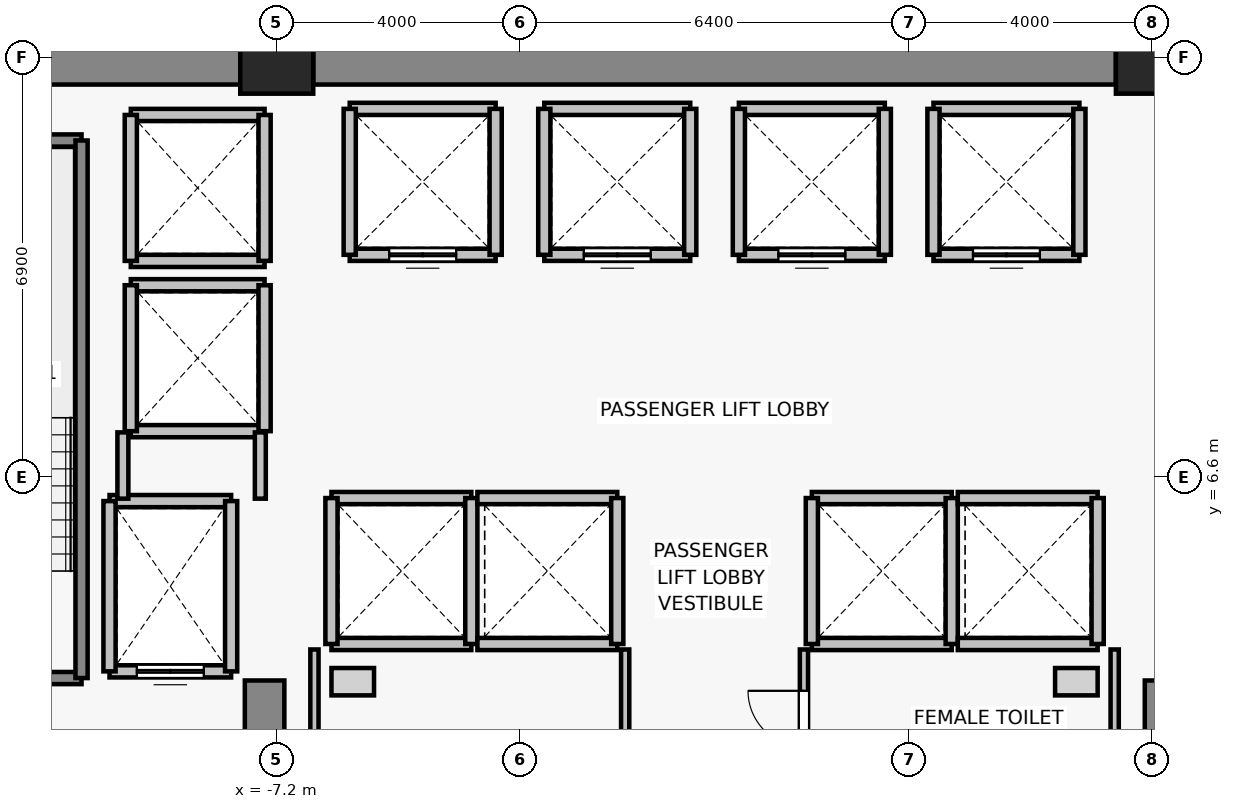
"""IFC4 building model, lengths in metres.
Left out: names, types, materials, properties, quantities, classifications, styles, units other than length and angle.
Written with IfcOpenShell. Run it as: python <this file> out.ifc"""

import sys

from ifc_helpers import new_model, si_unit, direction, frame, frame_2d, origin, origin_2d, place, context, subcontext, project, spatial, rectangle, extrude, source, transform, mapped, element, fill, save


model = new_model("IFC4")
c1 = context("Model", 3, precision=1e-05, world=origin(), true_north=direction((0.0, 1.0)))
c2 = subcontext(c1, "Body", "Model", "MODEL_VIEW")
j1 = project(units=[si_unit("LENGTHUNIT", "METRE"), si_unit("PLANEANGLEUNIT", "RADIAN")], contexts=[c1])
p1 = place(None, origin())
s1 = spatial("IfcSite", under=j1, at=p1, CompositionType="ELEMENT")
p2 = place(p1, origin())
s2 = spatial("IfcBuilding", under=s1, at=p2, CompositionType="ELEMENT")
p3 = place(p2, frame((0.0, 0.0, 37.3)))
s3 = spatial("IfcBuildingStorey", under=s2, at=p3, CompositionType="ELEMENT", Elevation=37.3)
for number, where, z_axis, x_axis in (
    (1, (-7.2, 13.5, 0.0), (0.0, 0.0, 1.0), (1.0, 0.0, 0.0)),
    (2, (7.2, 13.5, 0.0), (0.0, 0.0, 1.0), (1.0, 0.0, 0.0)),
):
    element("IfcColumn", number, at=place(p3, frame(where, z_axis=z_axis, x_axis=x_axis)), inside=s3, PredefinedType="COLUMN", context=c2, shape_type="SweptSolid", body=[
        extrude(rectangle(XDim=1.2, YDim=1.2, at=origin_2d()), origin(), (0.0, 0.0, 1.0), 3.3),
    ])
p4 = place(p3, frame((-13.8, 13.5, 0.0), z_axis=(0.0, 0.0, 1.0), x_axis=(1.0, 0.0, 0.0)))
e3 = element("IfcWall", 3, at=p4, inside=s3, PredefinedType="SHEAR", context=c2, shape_type="SweptSolid", body=[
    extrude(rectangle(XDim=6.0, YDim=0.9, at=frame_2d((3.0, 0.0))), origin(), (0.0, 0.0, 1.0), 3.075),
])
p5 = place(p3, frame((-6.6, 13.5, 0.0), z_axis=(0.0, 0.0, 1.0), x_axis=(1.0, 0.0, 0.0)))
e4 = element("IfcWall", 4, at=p5, inside=s3, PredefinedType="SHEAR", context=c2, shape_type="SweptSolid", body=[
    extrude(rectangle(XDim=13.2, YDim=0.9, at=frame_2d((6.6, 0.0))), origin(), (0.0, 0.0, 1.0), 3.075),
])
for number, where, z_axis, x_axis in (
    (5, (-7.4, -0.75, 0.0), (0.0, 0.0, 1.0), (0.0, 1.0, 0.0)),
    (6, (7.4, -0.75, 0.0), (0.0, 0.0, 1.0), (0.0, 1.0, 0.0)),
):
    element("IfcWall", number, at=place(p3, frame(where, z_axis=z_axis, x_axis=x_axis)), inside=s3, PredefinedType="SHEAR", context=c2, shape_type="SweptSolid", body=[
        extrude(rectangle(XDim=4.0, YDim=0.65, at=frame_2d((2.0, 0.0))), origin(), (0.0, 0.0, 1.0), 3.075),
    ])
p6 = place(p3, frame((-7.95, 3.4, 0.0), z_axis=(0.0, 0.0, 1.0), x_axis=(-1.0, 0.0, 0.0)))
e7 = element("IfcWall", 7, at=p6, inside=s3, PredefinedType="SOLIDWALL", context=c2, shape_type="SweptSolid", body=[
    extrude(rectangle(XDim=2.0, YDim=0.2, at=frame_2d((1.0, 0.0))), origin(), (0.0, 0.0, 1.0), 3.075),
])
p7 = place(p6, frame((0.45, 0.0, 0.0)))
e8 = element("IfcOpeningElement", 8, at=p7, cuts=e7, PredefinedType="OPENING", context=c2, shape_type="SweptSolid", body=[
    extrude(rectangle(XDim=1.1, YDim=2.2, at=frame_2d((0.55, 1.1))), frame((0.0, 0.11, 0.0), z_axis=(0.0, -1.0, 0.0), x_axis=(1.0, 0.0, 0.0)), (0.0, 0.0, 1.0), 0.22),
])
p8 = place(p3, frame((-9.95, 6.2, 0.0), z_axis=(0.0, 0.0, 1.0), x_axis=(1.0, 0.0, 0.0)))
e9 = element("IfcWall", 9, at=p8, inside=s3, PredefinedType="SOLIDWALL", context=c2, shape_type="SweptSolid", body=[
    extrude(rectangle(XDim=2.0, YDim=0.2, at=frame_2d((1.0, 0.0))), origin(), (0.0, 0.0, 1.0), 3.075),
])
for number, where, z_axis, x_axis in (
    (10, (-9.95, 3.4, 0.0), (0.0, 0.0, 1.0), (0.0, 1.0, 0.0)),
    (11, (-7.95, 6.2, 0.0), (0.0, 0.0, 1.0), (0.0, -1.0, 0.0)),
):
    element("IfcWall", number, at=place(p3, frame(where, z_axis=z_axis, x_axis=x_axis)), inside=s3, PredefinedType="SOLIDWALL", context=c2, shape_type="SweptSolid", body=[
        extrude(rectangle(XDim=2.8, YDim=0.2, at=frame_2d((1.4, 0.0))), origin(), (0.0, 0.0, 1.0), 3.075),
    ])
p9 = place(p3, frame((-3.6, 10.25, 0.0), z_axis=(0.0, 0.0, 1.0), x_axis=(-1.0, 0.0, 0.0)))
e12 = element("IfcWall", 12, at=p9, inside=s3, PredefinedType="SOLIDWALL", context=c2, shape_type="SweptSolid", body=[
    extrude(rectangle(XDim=2.4, YDim=0.2, at=frame_2d((1.2, 0.0))), origin(), (0.0, 0.0, 1.0), 3.075),
])
p10 = place(p9, frame((0.65, 0.0, 0.0)))
e13 = element("IfcOpeningElement", 13, at=p10, cuts=e12, PredefinedType="OPENING", context=c2, shape_type="SweptSolid", body=[
    extrude(rectangle(XDim=1.1, YDim=2.2, at=frame_2d((0.55, 1.1))), frame((0.0, 0.11, 0.0), z_axis=(0.0, -1.0, 0.0), x_axis=(1.0, 0.0, 0.0)), (0.0, 0.0, 1.0), 0.22),
])
for number, where, z_axis, x_axis in (
    (14, (-6.0, 12.65, 0.0), (0.0, 0.0, 1.0), (1.0, 0.0, 0.0)),
    (15, (-6.0, 10.25, 0.0), (0.0, 0.0, 1.0), (0.0, 1.0, 0.0)),
    (16, (-3.6, 12.65, 0.0), (0.0, 0.0, 1.0), (0.0, -1.0, 0.0)),
):
    element("IfcWall", number, at=place(p3, frame(where, z_axis=z_axis, x_axis=x_axis)), inside=s3, PredefinedType="SOLIDWALL", context=c2, shape_type="SweptSolid", body=[
        extrude(rectangle(XDim=2.4, YDim=0.2, at=frame_2d((1.2, 0.0))), origin(), (0.0, 0.0, 1.0), 3.075),
    ])
p11 = place(p3, frame((-0.4, 10.25, 0.0), z_axis=(0.0, 0.0, 1.0), x_axis=(-1.0, 0.0, 0.0)))
e17 = element("IfcWall", 17, at=p11, inside=s3, PredefinedType="SOLIDWALL", context=c2, shape_type="SweptSolid", body=[
    extrude(rectangle(XDim=2.4, YDim=0.2, at=frame_2d((1.2, 0.0))), origin(), (0.0, 0.0, 1.0), 3.075),
])
p12 = place(p11, frame((0.65, 0.0, 0.0)))
e18 = element("IfcOpeningElement", 18, at=p12, cuts=e17, PredefinedType="OPENING", context=c2, shape_type="SweptSolid", body=[
    extrude(rectangle(XDim=1.1, YDim=2.2, at=frame_2d((0.55, 1.1))), frame((0.0, 0.11, 0.0), z_axis=(0.0, -1.0, 0.0), x_axis=(1.0, 0.0, 0.0)), (0.0, 0.0, 1.0), 0.22),
])
p13 = place(p3, frame((-2.8, 12.65, 0.0), z_axis=(0.0, 0.0, 1.0), x_axis=(1.0, 0.0, 0.0)))
e19 = element("IfcWall", 19, at=p13, inside=s3, PredefinedType="SOLIDWALL", context=c2, shape_type="SweptSolid", body=[
    extrude(rectangle(XDim=2.4, YDim=0.2, at=frame_2d((1.2, 0.0))), origin(), (0.0, 0.0, 1.0), 3.075),
])
for number, where, z_axis, x_axis in (
    (20, (-2.8, 10.25, 0.0), (0.0, 0.0, 1.0), (0.0, 1.0, 0.0)),
    (21, (-0.4, 12.65, 0.0), (0.0, 0.0, 1.0), (0.0, -1.0, 0.0)),
):
    element("IfcWall", number, at=place(p3, frame(where, z_axis=z_axis, x_axis=x_axis)), inside=s3, PredefinedType="SOLIDWALL", context=c2, shape_type="SweptSolid", body=[
        extrude(rectangle(XDim=2.4, YDim=0.2, at=frame_2d((1.2, 0.0))), origin(), (0.0, 0.0, 1.0), 3.075),
    ])
p14 = place(p3, frame((2.8, 10.25, 0.0), z_axis=(0.0, 0.0, 1.0), x_axis=(-1.0, 0.0, 0.0)))
e22 = element("IfcWall", 22, at=p14, inside=s3, PredefinedType="SOLIDWALL", context=c2, shape_type="SweptSolid", body=[
    extrude(rectangle(XDim=2.4, YDim=0.2, at=frame_2d((1.2, 0.0))), origin(), (0.0, 0.0, 1.0), 3.075),
])
p15 = place(p14, frame((0.65, 0.0, 0.0)))
e23 = element("IfcOpeningElement", 23, at=p15, cuts=e22, PredefinedType="OPENING", context=c2, shape_type="SweptSolid", body=[
    extrude(rectangle(XDim=1.1, YDim=2.2, at=frame_2d((0.55, 1.1))), frame((0.0, 0.11, 0.0), z_axis=(0.0, -1.0, 0.0), x_axis=(1.0, 0.0, 0.0)), (0.0, 0.0, 1.0), 0.22),
])
p16 = place(p3, frame((0.4, 12.65, 0.0), z_axis=(0.0, 0.0, 1.0), x_axis=(1.0, 0.0, 0.0)))
e24 = element("IfcWall", 24, at=p16, inside=s3, PredefinedType="SOLIDWALL", context=c2, shape_type="SweptSolid", body=[
    extrude(rectangle(XDim=2.4, YDim=0.2, at=frame_2d((1.2, 0.0))), origin(), (0.0, 0.0, 1.0), 3.075),
])
for number, where, z_axis, x_axis in (
    (25, (0.4, 10.25, 0.0), (0.0, 0.0, 1.0), (0.0, 1.0, 0.0)),
    (26, (2.8, 12.65, 0.0), (0.0, 0.0, 1.0), (0.0, -1.0, 0.0)),
):
    element("IfcWall", number, at=place(p3, frame(where, z_axis=z_axis, x_axis=x_axis)), inside=s3, PredefinedType="SOLIDWALL", context=c2, shape_type="SweptSolid", body=[
        extrude(rectangle(XDim=2.4, YDim=0.2, at=frame_2d((1.2, 0.0))), origin(), (0.0, 0.0, 1.0), 3.075),
    ])
p17 = place(p3, frame((6.0, 10.25, 0.0), z_axis=(0.0, 0.0, 1.0), x_axis=(-1.0, 0.0, 0.0)))
e27 = element("IfcWall", 27, at=p17, inside=s3, PredefinedType="SOLIDWALL", context=c2, shape_type="SweptSolid", body=[
    extrude(rectangle(XDim=2.4, YDim=0.2, at=frame_2d((1.2, 0.0))), origin(), (0.0, 0.0, 1.0), 3.075),
])
p18 = place(p17, frame((0.65, 0.0, 0.0)))
e28 = element("IfcOpeningElement", 28, at=p18, cuts=e27, PredefinedType="OPENING", context=c2, shape_type="SweptSolid", body=[
    extrude(rectangle(XDim=1.1, YDim=2.2, at=frame_2d((0.55, 1.1))), frame((0.0, 0.11, 0.0), z_axis=(0.0, -1.0, 0.0), x_axis=(1.0, 0.0, 0.0)), (0.0, 0.0, 1.0), 0.22),
])
for number, where, z_axis, x_axis in (
    (29, (3.6, 12.65, 0.0), (0.0, 0.0, 1.0), (1.0, 0.0, 0.0)),
    (30, (3.6, 10.25, 0.0), (0.0, 0.0, 1.0), (0.0, 1.0, 0.0)),
    (31, (6.0, 12.65, 0.0), (0.0, 0.0, 1.0), (0.0, -1.0, 0.0)),
):
    element("IfcWall", number, at=place(p3, frame(where, z_axis=z_axis, x_axis=x_axis)), inside=s3, PredefinedType="SOLIDWALL", context=c2, shape_type="SweptSolid", body=[
        extrude(rectangle(XDim=2.4, YDim=0.2, at=frame_2d((1.2, 0.0))), origin(), (0.0, 0.0, 1.0), 3.075),
    ])
for number, where, z_axis, x_axis in (
    (32, (-4.0, 3.85, 0.0), (0.0, 0.0, 1.0), (-1.0, 0.0, 0.0)),
    (33, (-6.3, 6.25, 0.0), (0.0, 0.0, 1.0), (1.0, 0.0, 0.0)),
):
    element("IfcWall", number, at=place(p3, frame(where, z_axis=z_axis, x_axis=x_axis)), inside=s3, PredefinedType="SOLIDWALL", context=c2, shape_type="SweptSolid", body=[
        extrude(rectangle(XDim=2.3, YDim=0.2, at=frame_2d((1.15, 0.0))), origin(), (0.0, 0.0, 1.0), 3.075),
    ])
for number, where, z_axis, x_axis in (
    (34, (-6.3, 3.85, 0.0), (0.0, 0.0, 1.0), (0.0, 1.0, 0.0)),
    (35, (-4.0, 6.25, 0.0), (0.0, 0.0, 1.0), (0.0, -1.0, 0.0)),
):
    element("IfcWall", number, at=place(p3, frame(where, z_axis=z_axis, x_axis=x_axis)), inside=s3, PredefinedType="SOLIDWALL", context=c2, shape_type="SweptSolid", body=[
        extrude(rectangle(XDim=2.4, YDim=0.2, at=frame_2d((1.2, 0.0))), origin(), (0.0, 0.0, 1.0), 3.075),
    ])
for number, where, z_axis, x_axis in (
    (36, (-1.6, 3.85, 0.0), (0.0, 0.0, 1.0), (-1.0, 0.0, 0.0)),
    (37, (-3.9, 6.25, 0.0), (0.0, 0.0, 1.0), (1.0, 0.0, 0.0)),
):
    element("IfcWall", number, at=place(p3, frame(where, z_axis=z_axis, x_axis=x_axis)), inside=s3, PredefinedType="SOLIDWALL", context=c2, shape_type="SweptSolid", body=[
        extrude(rectangle(XDim=2.3, YDim=0.2, at=frame_2d((1.15, 0.0))), origin(), (0.0, 0.0, 1.0), 3.075),
    ])
p19 = place(p3, frame((-1.6, 6.25, 0.0), z_axis=(0.0, 0.0, 1.0), x_axis=(0.0, -1.0, 0.0)))
e38 = element("IfcWall", 38, at=p19, inside=s3, PredefinedType="SOLIDWALL", context=c2, shape_type="SweptSolid", body=[
    extrude(rectangle(XDim=2.4, YDim=0.2, at=frame_2d((1.2, 0.0))), origin(), (0.0, 0.0, 1.0), 3.075),
])
for number, where, z_axis, x_axis in (
    (39, (3.9, 3.85, 0.0), (0.0, 0.0, 1.0), (-1.0, 0.0, 0.0)),
    (40, (1.6, 6.25, 0.0), (0.0, 0.0, 1.0), (1.0, 0.0, 0.0)),
):
    element("IfcWall", number, at=place(p3, frame(where, z_axis=z_axis, x_axis=x_axis)), inside=s3, PredefinedType="SOLIDWALL", context=c2, shape_type="SweptSolid", body=[
        extrude(rectangle(XDim=2.3, YDim=0.2, at=frame_2d((1.15, 0.0))), origin(), (0.0, 0.0, 1.0), 3.075),
    ])
for number, where, z_axis, x_axis in (
    (41, (1.6, 3.85, 0.0), (0.0, 0.0, 1.0), (0.0, 1.0, 0.0)),
    (42, (3.9, 6.25, 0.0), (0.0, 0.0, 1.0), (0.0, -1.0, 0.0)),
):
    element("IfcWall", number, at=place(p3, frame(where, z_axis=z_axis, x_axis=x_axis)), inside=s3, PredefinedType="SOLIDWALL", context=c2, shape_type="SweptSolid", body=[
        extrude(rectangle(XDim=2.4, YDim=0.2, at=frame_2d((1.2, 0.0))), origin(), (0.0, 0.0, 1.0), 3.075),
    ])
for number, where, z_axis, x_axis in (
    (43, (6.3, 3.85, 0.0), (0.0, 0.0, 1.0), (-1.0, 0.0, 0.0)),
    (44, (4.0, 6.25, 0.0), (0.0, 0.0, 1.0), (1.0, 0.0, 0.0)),
):
    element("IfcWall", number, at=place(p3, frame(where, z_axis=z_axis, x_axis=x_axis)), inside=s3, PredefinedType="SOLIDWALL", context=c2, shape_type="SweptSolid", body=[
        extrude(rectangle(XDim=2.3, YDim=0.2, at=frame_2d((1.15, 0.0))), origin(), (0.0, 0.0, 1.0), 3.075),
    ])
p20 = place(p3, frame((6.3, 6.25, 0.0), z_axis=(0.0, 0.0, 1.0), x_axis=(0.0, -1.0, 0.0)))
e45 = element("IfcWall", 45, at=p20, inside=s3, PredefinedType="SOLIDWALL", context=c2, shape_type="SweptSolid", body=[
    extrude(rectangle(XDim=2.4, YDim=0.2, at=frame_2d((1.2, 0.0))), origin(), (0.0, 0.0, 1.0), 3.075),
])
for number, where, z_axis, x_axis in (
    (46, (-7.4, 7.35, 0.0), (0.0, 0.0, 1.0), (-1.0, 0.0, 0.0)),
    (47, (-9.6, 9.75, 0.0), (0.0, 0.0, 1.0), (1.0, 0.0, 0.0)),
):
    element("IfcWall", number, at=place(p3, frame(where, z_axis=z_axis, x_axis=x_axis)), inside=s3, PredefinedType="SOLIDWALL", context=c2, shape_type="SweptSolid", body=[
        extrude(rectangle(XDim=2.2, YDim=0.2, at=frame_2d((1.1, 0.0))), origin(), (0.0, 0.0, 1.0), 2.465),
    ])
p21 = place(p3, frame((-9.6, 7.35, 0.0), z_axis=(0.0, 0.0, 1.0), x_axis=(0.0, 1.0, 0.0)))
e48 = element("IfcWall", 48, at=p21, inside=s3, PredefinedType="SOLIDWALL", context=c2, shape_type="SweptSolid", body=[
    extrude(rectangle(XDim=2.4, YDim=0.2, at=frame_2d((1.2, 0.0))), origin(), (0.0, 0.0, 1.0), 3.075),
])
p22 = place(p3, frame((-7.4, 9.75, 0.0), z_axis=(0.0, 0.0, 1.0), x_axis=(0.0, -1.0, 0.0)))
e49 = element("IfcWall", 49, at=p22, inside=s3, PredefinedType="SOLIDWALL", context=c2, shape_type="SweptSolid", body=[
    extrude(rectangle(XDim=2.4, YDim=0.2, at=frame_2d((1.2, 0.0))), origin(), (0.0, 0.0, 1.0), 2.465),
])
for number, where, z_axis, x_axis in (
    (50, (-7.4, 10.15, 0.0), (0.0, 0.0, 1.0), (-1.0, 0.0, 0.0)),
    (51, (-9.6, 12.55, 0.0), (0.0, 0.0, 1.0), (1.0, 0.0, 0.0)),
):
    element("IfcWall", number, at=place(p3, frame(where, z_axis=z_axis, x_axis=x_axis)), inside=s3, PredefinedType="SOLIDWALL", context=c2, shape_type="SweptSolid", body=[
        extrude(rectangle(XDim=2.2, YDim=0.2, at=frame_2d((1.1, 0.0))), origin(), (0.0, 0.0, 1.0), 2.465),
    ])
p23 = place(p3, frame((-9.6, 10.15, 0.0), z_axis=(0.0, 0.0, 1.0), x_axis=(0.0, 1.0, 0.0)))
e52 = element("IfcWall", 52, at=p23, inside=s3, PredefinedType="SOLIDWALL", context=c2, shape_type="SweptSolid", body=[
    extrude(rectangle(XDim=2.4, YDim=0.2, at=frame_2d((1.2, 0.0))), origin(), (0.0, 0.0, 1.0), 3.075),
])
p24 = place(p3, frame((-7.4, 12.55, 0.0), z_axis=(0.0, 0.0, 1.0), x_axis=(0.0, -1.0, 0.0)))
e53 = element("IfcWall", 53, at=p24, inside=s3, PredefinedType="SOLIDWALL", context=c2, shape_type="SweptSolid", body=[
    extrude(rectangle(XDim=2.4, YDim=0.2, at=frame_2d((1.2, 0.0))), origin(), (0.0, 0.0, 1.0), 2.465),
])
p25 = place(p3, frame((-10.41, 3.29, 0.0), z_axis=(0.0, 0.0, 1.0), x_axis=(-1.0, 0.0, 0.0)))
e54 = element("IfcWall", 54, at=p25, inside=s3, PredefinedType="SOLIDWALL", context=c2, shape_type="SweptSolid", body=[
    extrude(rectangle(XDim=3.52, YDim=0.2, at=frame_2d((1.76, 0.0))), origin(), (0.0, 0.0, 1.0), 3.075),
])
p26 = place(p25, frame((1.165, 0.0, 0.0)))
e55 = element("IfcOpeningElement", 55, at=p26, cuts=e54, PredefinedType="OPENING", context=c2, shape_type="SweptSolid", body=[
    extrude(rectangle(XDim=1.15, YDim=2.15, at=frame_2d((0.575, 1.075))), frame((0.0, 0.11, 0.0), z_axis=(0.0, -1.0, 0.0), x_axis=(1.0, 0.0, 0.0)), (0.0, 0.0, 1.0), 0.22),
])
p27 = place(p3, frame((-13.93, 12.13, 0.0), z_axis=(0.0, 0.0, 1.0), x_axis=(1.0, 0.0, 0.0)))
e56 = element("IfcWall", 56, at=p27, inside=s3, PredefinedType="SOLIDWALL", context=c2, shape_type="SweptSolid", body=[
    extrude(rectangle(XDim=3.52, YDim=0.2, at=frame_2d((1.76, 0.0))), origin(), (0.0, 0.0, 1.0), 3.075),
])
p28 = place(p3, frame((-10.41, 12.13, 0.0), z_axis=(0.0, 0.0, 1.0), x_axis=(0.0, -1.0, 0.0)))
e57 = element("IfcWall", 57, at=p28, inside=s3, PredefinedType="SOLIDWALL", context=c2, shape_type="SweptSolid", body=[
    extrude(rectangle(XDim=8.84, YDim=0.2, at=frame_2d((4.42, 0.0))), origin(), (0.0, 0.0, 1.0), 3.075),
])
p29 = place(p3, frame((-9.73, 6.24, 0.0), z_axis=(0.0, 0.0, 1.0), x_axis=(0.0, 1.0, 0.0)))
e58 = element("IfcWall", 58, at=p29, inside=s3, PredefinedType="PARTITIONING", context=c2, shape_type="SweptSolid", body=[
    extrude(rectangle(XDim=1.09, YDim=0.18, at=frame_2d((0.545, 0.0))), origin(), (0.0, 0.0, 1.0), 3.075),
])
p30 = place(p3, frame((-7.47, 7.33, 0.0), z_axis=(0.0, 0.0, 1.0), x_axis=(0.0, -1.0, 0.0)))
e59 = element("IfcWall", 59, at=p30, inside=s3, PredefinedType="PARTITIONING", context=c2, shape_type="SweptSolid", body=[
    extrude(rectangle(XDim=1.09, YDim=0.18, at=frame_2d((0.545, 0.0))), origin(), (0.0, 0.0, 1.0), 2.465),
])
p31 = place(p3, frame((-6.58, -0.73, 0.0), z_axis=(0.0, 0.0, 1.0), x_axis=(0.0, 1.0, 0.0)))
e60 = element("IfcWall", 60, at=p31, inside=s3, PredefinedType="PARTITIONING", context=c2, shape_type="SweptSolid", body=[
    extrude(rectangle(XDim=4.49, YDim=0.135, at=frame_2d((2.245, 0.0))), origin(), (0.0, 0.0, 1.0), 3.075),
])
p32 = place(p3, frame((-1.47, 3.76, 0.0), z_axis=(0.0, 0.0, 1.0), x_axis=(0.0, -1.0, 0.0)))
e61 = element("IfcWall", 61, at=p32, inside=s3, PredefinedType="PARTITIONING", context=c2, shape_type="SweptSolid", body=[
    extrude(rectangle(XDim=4.49, YDim=0.135, at=frame_2d((2.245, 0.0))), origin(), (0.0, 0.0, 1.0), 3.075),
])
p33 = place(p32, frame((1.8, 0.0, 0.0)))
e62 = element("IfcOpeningElement", 62, at=p33, cuts=e61, PredefinedType="OPENING", context=c2, shape_type="SweptSolid", body=[
    extrude(rectangle(XDim=0.92, YDim=2.1, at=frame_2d((0.46, 1.05))), frame((0.0, 0.077, 0.0), z_axis=(0.0, -1.0, 0.0), x_axis=(1.0, 0.0, 0.0)), (0.0, 0.0, 1.0), 0.155),
])
p34 = place(p3, frame((1.47, 1.48, 0.0), z_axis=(0.0, 0.0, 1.0), x_axis=(0.0, 1.0, 0.0)))
e63 = element("IfcWall", 63, at=p34, inside=s3, PredefinedType="PARTITIONING", context=c2, shape_type="SweptSolid", body=[
    extrude(rectangle(XDim=2.28, YDim=0.135, at=frame_2d((1.14, 0.0))), origin(), (0.0, 0.0, 1.0), 3.075),
])
p35 = place(p34, frame((0.68, 0.0, 0.0)))
e64 = element("IfcOpeningElement", 64, at=p35, cuts=e63, PredefinedType="OPENING", context=c2, shape_type="SweptSolid", body=[
    extrude(rectangle(XDim=0.92, YDim=2.1, at=frame_2d((0.46, 1.05))), frame((0.0, 0.077, 0.0), z_axis=(0.0, -1.0, 0.0), x_axis=(1.0, 0.0, 0.0)), (0.0, 0.0, 1.0), 0.155),
])
p36 = place(p3, frame((6.58, 3.76, 0.0), z_axis=(0.0, 0.0, 1.0), x_axis=(0.0, -1.0, 0.0)))
e65 = element("IfcWall", 65, at=p36, inside=s3, PredefinedType="PARTITIONING", context=c2, shape_type="SweptSolid", body=[
    extrude(rectangle(XDim=2.28, YDim=0.135, at=frame_2d((1.14, 0.0))), origin(), (0.0, 0.0, 1.0), 3.075),
])
m1 = source(origin(), c2, "Body", "SweptSolid", [
    extrude(rectangle(XDim=1.1, YDim=2.2, at=frame_2d((0.55, 1.1))), frame((0.0, 0.025, 0.0), z_axis=(0.0, -1.0, 0.0), x_axis=(1.0, 0.0, 0.0)), (0.0, 0.0, 1.0), 0.05),
])
p37 = place(p7, origin())
e66 = element("IfcDoor", 66, at=p37, inside=s3, OperationType="DOUBLE_DOOR_SLIDING", PredefinedType="DOOR", context=c2, shape_type="MappedRepresentation", body=[
    mapped(m1, transform((0.0, 0.0, 0.0), x_axis=(1.0, 0.0, 0.0), y_axis=(0.0, 1.0, 0.0), z_axis=(0.0, 0.0, 1.0), scale=1.0)),
])
fill(e8, e66)
p38 = place(p10, origin())
e67 = element("IfcDoor", 67, at=p38, inside=s3, OperationType="DOUBLE_DOOR_SLIDING", PredefinedType="DOOR", context=c2, shape_type="MappedRepresentation", body=[
    mapped(m1, transform((0.0, 0.0, 0.0), x_axis=(1.0, 0.0, 0.0), y_axis=(0.0, 1.0, 0.0), z_axis=(0.0, 0.0, 1.0), scale=1.0)),
])
fill(e13, e67)
p39 = place(p12, origin())
e68 = element("IfcDoor", 68, at=p39, inside=s3, OperationType="DOUBLE_DOOR_SLIDING", PredefinedType="DOOR", context=c2, shape_type="MappedRepresentation", body=[
    mapped(m1, transform((0.0, 0.0, 0.0), x_axis=(1.0, 0.0, 0.0), y_axis=(0.0, 1.0, 0.0), z_axis=(0.0, 0.0, 1.0), scale=1.0)),
])
fill(e18, e68)
p40 = place(p15, origin())
e69 = element("IfcDoor", 69, at=p40, inside=s3, OperationType="DOUBLE_DOOR_SLIDING", PredefinedType="DOOR", context=c2, shape_type="MappedRepresentation", body=[
    mapped(m1, transform((0.0, 0.0, 0.0), x_axis=(1.0, 0.0, 0.0), y_axis=(0.0, 1.0, 0.0), z_axis=(0.0, 0.0, 1.0), scale=1.0)),
])
fill(e23, e69)
p41 = place(p18, origin())
e70 = element("IfcDoor", 70, at=p41, inside=s3, OperationType="DOUBLE_DOOR_SLIDING", PredefinedType="DOOR", context=c2, shape_type="MappedRepresentation", body=[
    mapped(m1, transform((0.0, 0.0, 0.0), x_axis=(1.0, 0.0, 0.0), y_axis=(0.0, 1.0, 0.0), z_axis=(0.0, 0.0, 1.0), scale=1.0)),
])
fill(e28, e70)
m2 = source(origin(), c2, "Body", "SweptSolid", [
    extrude(rectangle(XDim=0.92, YDim=2.1, at=frame_2d((0.46, 1.05))), frame((0.0, 0.025, 0.0), z_axis=(0.0, -1.0, 0.0), x_axis=(1.0, 0.0, 0.0)), (0.0, 0.0, 1.0), 0.05),
])
p42 = place(p35, origin())
e71 = element("IfcDoor", 71, at=p42, inside=s3, OperationType="SINGLE_SWING_RIGHT", PredefinedType="DOOR", context=c2, shape_type="MappedRepresentation", body=[
    mapped(m2, transform((0.0, 0.0, 0.0), x_axis=(1.0, 0.0, 0.0), y_axis=(0.0, 1.0, 0.0), z_axis=(0.0, 0.0, 1.0), scale=1.0)),
])
fill(e64, e71)
save(model, sys.argv[1])
